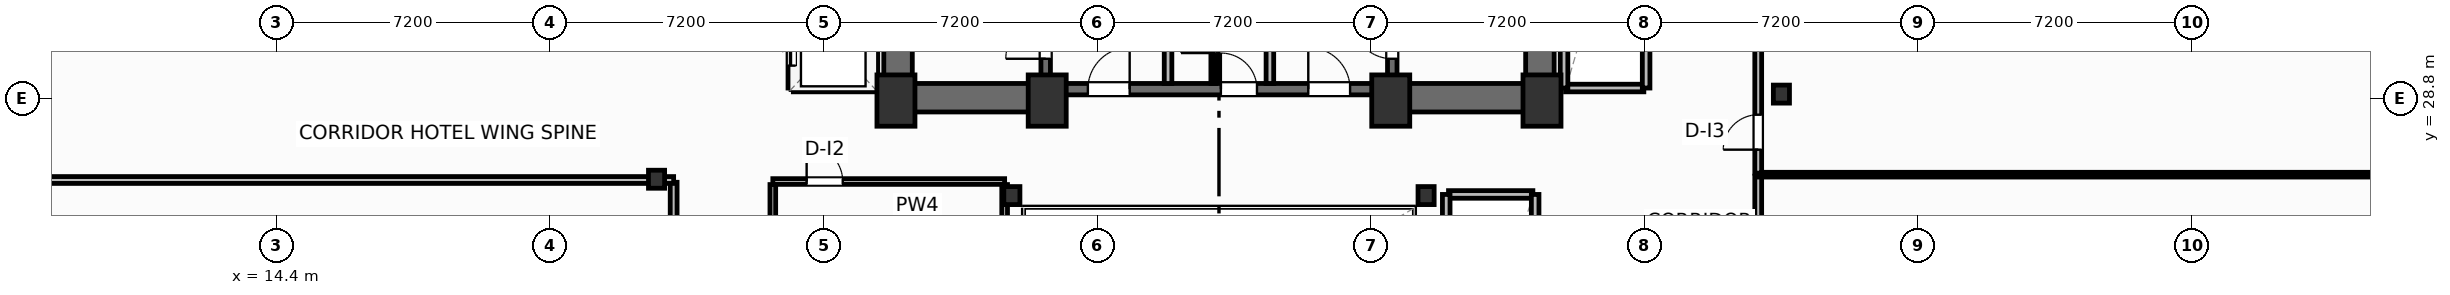
"""IFC4 building model, lengths in metres.
Left out: names, types, materials, properties, quantities, classifications, styles, units other than length and angle.
Written with IfcOpenShell. Run it as: python <this file> out.ifc"""

import sys

from ifc_helpers import new_model, si_unit, direction, frame, frame_2d, origin, origin_2d, place, context, subcontext, project, spatial, rectangle, i_section, extrude, element, fill, save


model = new_model("IFC4")
c1 = context("Model", 3, precision=1e-05, world=origin(), true_north=direction((0.0, 1.0)))
c2 = subcontext(c1, "Body", "Model", "MODEL_VIEW")
j1 = project(units=[si_unit("LENGTHUNIT", "METRE"), si_unit("PLANEANGLEUNIT", "RADIAN")], contexts=[c1])
p1 = place(None, origin())
s1 = spatial("IfcSite", under=j1, at=p1, CompositionType="ELEMENT")
p2 = place(p1, origin())
s2 = spatial("IfcBuilding", under=s1, at=p2, CompositionType="ELEMENT")
p3 = place(p2, frame((0.0, 0.0, 98.4)))
s3 = spatial("IfcBuildingStorey", under=s2, at=p3, CompositionType="ELEMENT", Elevation=98.4)
for number, where, z_axis, x_axis in (
    (1, (30.7, 28.75, 0.0), (0.0, 0.0, 1.0), (1.0, 0.0, 0.0)),
    (2, (34.68, 28.75, 0.0), (0.0, 0.0, 1.0), (1.0, 0.0, 0.0)),
    (3, (43.72, 28.75, 0.0), (0.0, 0.0, 1.0), (1.0, 0.0, 0.0)),
    (4, (47.7, 28.75, 0.0), (0.0, 0.0, 1.0), (1.0, 0.0, 0.0)),
):
    element("IfcColumn", number, at=place(p3, frame(where, z_axis=z_axis, x_axis=x_axis)), inside=s3, PredefinedType="COLUMN", context=c2, shape_type="SweptSolid", body=[
        extrude(rectangle(XDim=1.0, YDim=1.35, at=origin_2d()), origin(), (0.0, 0.0, 1.0), 3.7),
    ])
for number, where, z_axis, x_axis in (
    (5, (33.75, 26.25, 0.0), (0.0, 0.0, 1.0), (1.0, 0.0, 0.0)),
    (6, (44.65, 26.25, 0.0), (0.0, 0.0, 1.0), (1.0, 0.0, 0.0)),
    (7, (24.4, 26.68, 0.0), (0.0, 0.0, 1.0), (1.0, 0.0, 0.0)),
    (8, (54.0, 28.92, 0.0), (0.0, 0.0, 1.0), (1.0, 0.0, 0.0)),
):
    element("IfcColumn", number, at=place(p3, frame(where, z_axis=z_axis, x_axis=x_axis)), inside=s3, PredefinedType="COLUMN", context=c2, shape_type="SweptSolid", body=[
        extrude(i_section(OverallWidth=0.424, OverallDepth=0.474, WebThickness=0.048, FlangeThickness=0.077, FilletRadius=0.025, at=origin_2d()), origin(), (0.0, 0.0, 1.0), 3.7),
    ])
for number, where, z_axis, x_axis in (
    (9, (30.755, 29.2, 0.0), (0.0, 0.0, 1.0), (0.0, 1.0, 0.0)),
    (10, (47.645, 29.2, 0.0), (0.0, 0.0, 1.0), (0.0, 1.0, 0.0)),
):
    element("IfcWall", number, at=place(p3, frame(where, z_axis=z_axis, x_axis=x_axis)), inside=s3, PredefinedType="SHEAR", context=c2, shape_type="SweptSolid", body=[
        extrude(rectangle(XDim=9.22, YDim=0.75, at=frame_2d((4.61, 0.0))), origin(), (0.0, 0.0, 1.0), 3.45),
    ])
p4 = place(p3, frame((30.38, 28.825, 0.0), z_axis=(0.0, 0.0, 1.0), x_axis=(1.0, 0.0, 0.0)))
e11 = element("IfcWall", 11, at=p4, inside=s3, PredefinedType="SHEAR", context=c2, shape_type="SweptSolid", body=[
    extrude(rectangle(XDim=4.42, YDim=0.75, at=frame_2d((2.21, 0.0))), origin(), (0.0, 0.0, 1.0), 3.45),
])
p5 = place(p3, frame((43.6, 28.825, 0.0), z_axis=(0.0, 0.0, 1.0), x_axis=(1.0, 0.0, 0.0)))
e12 = element("IfcWall", 12, at=p5, inside=s3, PredefinedType="SHEAR", context=c2, shape_type="SweptSolid", body=[
    extrude(rectangle(XDim=4.42, YDim=0.75, at=frame_2d((2.21, 0.0))), origin(), (0.0, 0.0, 1.0), 3.45),
])
p6 = place(p3, frame((34.8, 29.05, 0.0), z_axis=(0.0, 0.0, 1.0), x_axis=(1.0, 0.0, 0.0)))
e13 = element("IfcWall", 13, at=p6, inside=s3, PredefinedType="SHEAR", context=c2, shape_type="SweptSolid", body=[
    extrude(rectangle(XDim=8.8, YDim=0.3, at=frame_2d((4.4, 0.0))), origin(), (0.0, 0.0, 1.0), 3.45),
])
p7 = place(p6, frame((0.95, 0.0, 0.0)))
e14 = element("IfcOpeningElement", 14, at=p7, cuts=e13, PredefinedType="OPENING", context=c2, shape_type="SweptSolid", body=[
    extrude(rectangle(XDim=1.1, YDim=2.15, at=frame_2d((0.55, 1.075))), frame((0.0, 0.16, 0.0), z_axis=(0.0, -1.0, 0.0), x_axis=(1.0, 0.0, 0.0)), (0.0, 0.0, 1.0), 0.32),
])
p8 = place(p6, frame((6.75, 0.0, 0.0)))
e15 = element("IfcOpeningElement", 15, at=p8, cuts=e13, PredefinedType="OPENING", context=c2, shape_type="SweptSolid", body=[
    extrude(rectangle(XDim=1.1, YDim=2.15, at=frame_2d((0.55, 1.075))), frame((0.0, 0.16, 0.0), z_axis=(0.0, -1.0, 0.0), x_axis=(1.0, 0.0, 0.0)), (0.0, 0.0, 1.0), 0.32),
])
p9 = place(p6, frame((4.45, 0.0, 0.0)))
e16 = element("IfcOpeningElement", 16, at=p9, cuts=e13, PredefinedType="OPENING", context=c2, shape_type="SweptSolid", body=[
    extrude(rectangle(XDim=0.95, YDim=2.15, at=frame_2d((0.475, 1.075))), frame((0.0, 0.16, 0.0), z_axis=(0.0, -1.0, 0.0), x_axis=(1.0, 0.0, 0.0)), (0.0, 0.0, 1.0), 0.32),
])
p10 = place(p3, frame((34.64, 29.2, 0.0), z_axis=(0.0, 0.0, 1.0), x_axis=(0.0, 1.0, 0.0)))
e17 = element("IfcWall", 17, at=p10, inside=s3, PredefinedType="SHEAR", context=c2, shape_type="SweptSolid", body=[
    extrude(rectangle(XDim=9.22, YDim=0.25, at=frame_2d((4.61, 0.0))), origin(), (0.0, 0.0, 1.0), 3.45),
])
p11 = place(p10, frame((0.65, 0.0, 0.0)))
e18 = element("IfcOpeningElement", 18, at=p11, cuts=e17, PredefinedType="OPENING", context=c2, shape_type="SweptSolid", body=[
    extrude(rectangle(XDim=1.05, YDim=2.15, at=frame_2d((0.525, 1.075))), frame((0.0, 0.135, 0.0), z_axis=(0.0, -1.0, 0.0), x_axis=(1.0, 0.0, 0.0)), (0.0, 0.0, 1.0), 0.27),
])
p12 = place(p3, frame((43.76, 29.2, 0.0), z_axis=(0.0, 0.0, 1.0), x_axis=(0.0, 1.0, 0.0)))
e19 = element("IfcWall", 19, at=p12, inside=s3, PredefinedType="SHEAR", context=c2, shape_type="SweptSolid", body=[
    extrude(rectangle(XDim=9.22, YDim=0.25, at=frame_2d((4.61, 0.0))), origin(), (0.0, 0.0, 1.0), 3.45),
])
p13 = place(p12, frame((0.65, 0.0, 0.0)))
e20 = element("IfcOpeningElement", 20, at=p13, cuts=e19, PredefinedType="OPENING", context=c2, shape_type="SweptSolid", body=[
    extrude(rectangle(XDim=1.05, YDim=2.15, at=frame_2d((0.525, 1.075))), frame((0.0, 0.135, 0.0), z_axis=(0.0, -1.0, 0.0), x_axis=(1.0, 0.0, 0.0)), (0.0, 0.0, 1.0), 0.27),
])
p14 = place(p3, frame((24.85, 23.03, 0.0), z_axis=(0.0, 0.0, 1.0), x_axis=(0.0, 1.0, 0.0)))
e21 = element("IfcWall", 21, at=p14, inside=s3, PredefinedType="PARTITIONING", context=c2, shape_type="SweptSolid", body=[
    extrude(rectangle(XDim=3.57, YDim=0.18, at=frame_2d((1.785, 0.0))), origin(), (0.0, 0.0, 1.0), 3.45),
])
p15 = place(p14, frame((1.5, 0.0, 0.0)))
e22 = element("IfcOpeningElement", 22, at=p15, cuts=e21, PredefinedType="OPENING", context=c2, shape_type="SweptSolid", body=[
    extrude(rectangle(XDim=0.92, YDim=2.05, at=frame_2d((0.46, 1.025))), frame((0.0, 0.1, 0.0), z_axis=(0.0, -1.0, 0.0), x_axis=(1.0, 0.0, 0.0)), (0.0, 0.0, 1.0), 0.2),
])
p16 = place(p3, frame((-0.086, 26.66, 0.0), z_axis=(0.0, 0.0, 1.0), x_axis=(1.0, 0.0, 0.0)))
e23 = element("IfcWall", 23, at=p16, inside=s3, PredefinedType="PARTITIONING", context=c2, shape_type="SweptSolid", body=[
    extrude(rectangle(XDim=24.936, YDim=0.18, at=frame_2d((12.468, 0.0))), origin(), (0.0, 0.0, 1.0), 2.662),
])
p17 = place(p3, frame((53.39, 19.24, 0.0), z_axis=(0.0, 0.0, 1.0), x_axis=(0.0, 1.0, 0.0)))
e24 = element("IfcWall", 24, at=p17, inside=s3, PredefinedType="PARTITIONING", context=c2, shape_type="SweptSolid", body=[
    extrude(rectangle(XDim=7.52, YDim=0.18, at=frame_2d((3.76, 0.0))), origin(), (0.0, 0.0, 1.0), 3.45),
])
p18 = place(p17, frame((2.1, 0.0, 0.0)))
e25 = element("IfcOpeningElement", 25, at=p18, cuts=e24, PredefinedType="OPENING", context=c2, shape_type="SweptSolid", body=[
    extrude(rectangle(XDim=0.92, YDim=2.05, at=frame_2d((0.46, 1.025))), frame((0.0, 0.1, 0.0), z_axis=(0.0, -1.0, 0.0), x_axis=(1.0, 0.0, 0.0)), (0.0, 0.0, 1.0), 0.2),
])
p19 = place(p3, frame((53.39, 26.8, 0.0), z_axis=(0.0, 0.0, 1.0), x_axis=(1.0, 0.0, 0.0)))
e26 = element("IfcWall", 26, at=p19, inside=s3, PredefinedType="PARTITIONING", context=c2, shape_type="SweptSolid", body=[
    extrude(rectangle(XDim=23.61, YDim=0.125, at=frame_2d((11.805, 0.0))), origin(), (0.0, 0.0, 1.0), 3.45),
])
p20 = place(p3, frame((53.39, 26.84, 0.0), z_axis=(0.0, 0.0, 1.0), x_axis=(0.0, 1.0, 0.0)))
e27 = element("IfcWall", 27, at=p20, inside=s3, PredefinedType="PARTITIONING", context=c2, shape_type="SweptSolid", body=[
    extrude(rectangle(XDim=12.46, YDim=0.18, at=frame_2d((6.23, 0.0))), origin(), (0.0, 0.0, 1.0), 3.45),
])
p21 = place(p20, frame((0.618, 0.0, 0.0)))
e28 = element("IfcOpeningElement", 28, at=p21, cuts=e27, PredefinedType="OPENING", context=c2, shape_type="SweptSolid", body=[
    extrude(rectangle(XDim=0.92, YDim=2.05, at=frame_2d((0.46, 1.025))), frame((0.0, 0.1, 0.0), z_axis=(0.0, -1.0, 0.0), x_axis=(1.0, 0.0, 0.0)), (0.0, 0.0, 1.0), 0.2),
])
for number, where, z_axis, x_axis in (
    (29, (37.86, 29.2, 0.0), (0.0, 0.0, 1.0), (0.0, 1.0, 0.0)),
    (30, (40.54, 29.2, 0.0), (0.0, 0.0, 1.0), (0.0, 1.0, 0.0)),
):
    element("IfcWall", number, at=place(p3, frame(where, z_axis=z_axis, x_axis=x_axis)), inside=s3, PredefinedType="PARTITIONING", context=c2, shape_type="SweptSolid", body=[
        extrude(rectangle(XDim=5.18, YDim=0.2, at=frame_2d((2.59, 0.0))), origin(), (0.0, 0.0, 1.0), 3.45),
    ])
p22 = place(p3, frame((39.05, 29.2, 0.0), z_axis=(0.0, 0.0, 1.0), x_axis=(0.0, 1.0, 0.0)))
e31 = element("IfcWall", 31, at=p22, inside=s3, PredefinedType="PARTITIONING", context=c2, shape_type="SweptSolid", body=[
    extrude(rectangle(XDim=5.22, YDim=0.125, at=frame_2d((2.61, 0.0))), origin(), (0.0, 0.0, 1.0), 3.45),
])
p23 = place(p22, frame((0.8, 0.0, 0.0)))
e32 = element("IfcOpeningElement", 32, at=p23, cuts=e31, PredefinedType="OPENING", context=c2, shape_type="SweptSolid", body=[
    extrude(rectangle(XDim=0.85, YDim=2.05, at=frame_2d((0.425, 1.025))), frame((0.0, 0.073, 0.0), z_axis=(0.0, -1.0, 0.0), x_axis=(1.0, 0.0, 0.0)), (0.0, 0.0, 1.0), 0.145),
])
p24 = place(p22, frame((3.4, 0.0, 0.0)))
e33 = element("IfcOpeningElement", 33, at=p24, cuts=e31, PredefinedType="OPENING", context=c2, shape_type="SweptSolid", body=[
    extrude(rectangle(XDim=0.85, YDim=2.05, at=frame_2d((0.425, 1.025))), frame((0.0, 0.073, 0.0), z_axis=(0.0, -1.0, 0.0), x_axis=(1.0, 0.0, 0.0)), (0.0, 0.0, 1.0), 0.145),
])
p25 = place(p3, frame((27.46, 26.62, 0.0), z_axis=(0.0, 0.0, 1.0), x_axis=(1.0, 0.0, 0.0)))
e34 = element("IfcWall", 34, at=p25, inside=s3, PredefinedType="PARTITIONING", context=c2, shape_type="SweptSolid", body=[
    extrude(rectangle(XDim=6.1, YDim=0.15, at=frame_2d((3.05, 0.0))), origin(), (0.0, 0.0, 1.0), 2.662),
])
p26 = place(p25, frame((0.89, 0.0, 0.0)))
e35 = element("IfcOpeningElement", 35, at=p26, cuts=e34, PredefinedType="OPENING", context=c2, shape_type="SweptSolid", body=[
    extrude(rectangle(XDim=0.95, YDim=2.05, at=frame_2d((0.475, 1.025))), frame((0.0, 0.085, 0.0), z_axis=(0.0, -1.0, 0.0), x_axis=(1.0, 0.0, 0.0)), (0.0, 0.0, 1.0), 0.17),
])
p27 = place(p3, frame((27.46, 19.38, 0.0), z_axis=(0.0, 0.0, 1.0), x_axis=(0.0, 1.0, 0.0)))
e36 = element("IfcWall", 36, at=p27, inside=s3, PredefinedType="PARTITIONING", context=c2, shape_type="SweptSolid", body=[
    extrude(rectangle(XDim=7.16, YDim=0.15, at=frame_2d((3.58, 0.0))), origin(), (0.0, 0.0, 1.0), 3.45),
])
p28 = place(p27, frame((1.1, 0.0, 0.0)))
e37 = element("IfcOpeningElement", 37, at=p28, cuts=e36, PredefinedType="OPENING", context=c2, shape_type="SweptSolid", body=[
    extrude(rectangle(XDim=0.9, YDim=2.05, at=frame_2d((0.45, 1.025))), frame((0.0, 0.085, 0.0), z_axis=(0.0, -1.0, 0.0), x_axis=(1.0, 0.0, 0.0)), (0.0, 0.0, 1.0), 0.17),
])
p29 = place(p3, frame((33.56, 19.38, 0.0), z_axis=(0.0, 0.0, 1.0), x_axis=(0.0, 1.0, 0.0)))
e38 = element("IfcWall", 38, at=p29, inside=s3, PredefinedType="PARTITIONING", context=c2, shape_type="SweptSolid", body=[
    extrude(rectangle(XDim=7.16, YDim=0.15, at=frame_2d((3.58, 0.0))), origin(), (0.0, 0.0, 1.0), 2.824),
])
p30 = place(p3, frame((28.0, 29.08, 0.0), z_axis=(0.0, 0.0, 1.0), x_axis=(1.0, 0.0, 0.0)))
e39 = element("IfcWall", 39, at=p30, inside=s3, PredefinedType="PARTITIONING", context=c2, shape_type="SweptSolid", body=[
    extrude(rectangle(XDim=2.1, YDim=0.2, at=frame_2d((1.05, 0.0))), origin(), (0.0, 0.0, 1.0), 3.45),
])
p31 = place(p3, frame((30.12, 29.08, 0.0), z_axis=(0.0, 0.0, 1.0), x_axis=(0.0, 1.0, 0.0)))
e40 = element("IfcWall", 40, at=p31, inside=s3, PredefinedType="PARTITIONING", context=c2, shape_type="SweptSolid", body=[
    extrude(rectangle(XDim=6.89, YDim=0.2, at=frame_2d((3.445, 0.0))), origin(), (0.0, 0.0, 1.0), 3.45),
])
p32 = place(p3, frame((27.96, 29.08, 0.0), z_axis=(0.0, 0.0, 1.0), x_axis=(0.0, 1.0, 0.0)))
e41 = element("IfcWall", 41, at=p32, inside=s3, PredefinedType="PARTITIONING", context=c2, shape_type="SweptSolid", body=[
    extrude(rectangle(XDim=6.89, YDim=0.2, at=frame_2d((3.445, 0.0))), origin(), (0.0, 0.0, 1.0), 3.45),
])
p33 = place(p32, frame((0.59, 0.0, 0.0)))
e42 = element("IfcOpeningElement", 42, at=p33, cuts=e41, PredefinedType="OPENING", context=c2, shape_type="SweptSolid", body=[
    extrude(rectangle(XDim=1.1, YDim=2.15, at=frame_2d((0.55, 1.075))), frame((0.0, 0.11, 0.0), z_axis=(0.0, -1.0, 0.0), x_axis=(1.0, 0.0, 0.0)), (0.0, 0.0, 1.0), 0.22),
])
p34 = place(p32, frame((2.89, 0.0, 0.0)))
e43 = element("IfcOpeningElement", 43, at=p34, cuts=e41, PredefinedType="OPENING", context=c2, shape_type="SweptSolid", body=[
    extrude(rectangle(XDim=1.1, YDim=2.15, at=frame_2d((0.55, 1.075))), frame((0.0, 0.11, 0.0), z_axis=(0.0, -1.0, 0.0), x_axis=(1.0, 0.0, 0.0)), (0.0, 0.0, 1.0), 0.22),
])
p35 = place(p32, frame((5.19, 0.0, 0.0)))
e44 = element("IfcOpeningElement", 44, at=p35, cuts=e41, PredefinedType="OPENING", context=c2, shape_type="SweptSolid", body=[
    extrude(rectangle(XDim=1.1, YDim=2.15, at=frame_2d((0.55, 1.075))), frame((0.0, 0.11, 0.0), z_axis=(0.0, -1.0, 0.0), x_axis=(1.0, 0.0, 0.0)), (0.0, 0.0, 1.0), 0.22),
])
p36 = place(p3, frame((48.32, 29.08, 0.0), z_axis=(0.0, 0.0, 1.0), x_axis=(1.0, 0.0, 0.0)))
e45 = element("IfcWall", 45, at=p36, inside=s3, PredefinedType="PARTITIONING", context=c2, shape_type="SweptSolid", body=[
    extrude(rectangle(XDim=2.06, YDim=0.2, at=frame_2d((1.03, 0.0))), origin(), (0.0, 0.0, 1.0), 2.662),
])
for number, where, z_axis, x_axis in (
    (46, (48.28, 29.08, 0.0), (0.0, 0.0, 1.0), (0.0, 1.0, 0.0)),
    (47, (50.44, 29.08, 0.0), (0.0, 0.0, 1.0), (0.0, 1.0, 0.0)),
):
    element("IfcWall", number, at=place(p3, frame(where, z_axis=z_axis, x_axis=x_axis)), inside=s3, PredefinedType="PARTITIONING", context=c2, shape_type="SweptSolid", body=[
        extrude(rectangle(XDim=6.89, YDim=0.2, at=frame_2d((3.445, 0.0))), origin(), (0.0, 0.0, 1.0), 3.45),
    ])
p37 = place(p3, frame((45.24, 26.28, 0.0), z_axis=(0.0, 0.0, 1.0), x_axis=(1.0, 0.0, 0.0)))
e48 = element("IfcWall", 48, at=p37, inside=s3, PredefinedType="PARTITIONING", context=c2, shape_type="SweptSolid", body=[
    extrude(rectangle(XDim=2.22, YDim=0.2, at=frame_2d((1.11, 0.0))), origin(), (0.0, 0.0, 1.0), 3.45),
])
for number, where, z_axis, x_axis in (
    (49, (45.18, 19.38, 0.0), (0.0, 0.0, 1.0), (0.0, 1.0, 0.0)),
    (50, (47.52, 19.38, 0.0), (0.0, 0.0, 1.0), (0.0, 1.0, 0.0)),
):
    element("IfcWall", number, at=place(p3, frame(where, z_axis=z_axis, x_axis=x_axis)), inside=s3, PredefinedType="PARTITIONING", context=c2, shape_type="SweptSolid", body=[
        extrude(rectangle(XDim=6.9, YDim=0.2, at=frame_2d((3.45, 0.0))), origin(), (0.0, 0.0, 1.0), 3.45),
    ])
p38 = place(p21, origin())
e51 = element("IfcDoor", 51, at=p38, inside=s3, OperationType="SINGLE_SWING_LEFT", PredefinedType="DOOR", context=c2, shape_type="SweptSolid", body=[
    extrude(rectangle(XDim=0.92, YDim=2.05, at=frame_2d((0.46, 1.025))), frame((0.0, 0.025, 0.0), z_axis=(0.0, -1.0, 0.0), x_axis=(1.0, 0.0, 0.0)), (0.0, 0.0, 1.0), 0.05),
])
fill(e28, e51)
p39 = place(p11, origin())
e52 = element("IfcDoor", 52, at=p39, inside=s3, OperationType="SINGLE_SWING_LEFT", PredefinedType="DOOR", context=c2, shape_type="SweptSolid", body=[
    extrude(rectangle(XDim=1.05, YDim=2.15, at=frame_2d((0.525, 1.075))), frame((0.0, 0.025, 0.0), z_axis=(0.0, -1.0, 0.0), x_axis=(1.0, 0.0, 0.0)), (0.0, 0.0, 1.0), 0.05),
])
fill(e18, e52)
p40 = place(p13, origin())
e53 = element("IfcDoor", 53, at=p40, inside=s3, OperationType="SINGLE_SWING_RIGHT", PredefinedType="DOOR", context=c2, shape_type="SweptSolid", body=[
    extrude(rectangle(XDim=1.05, YDim=2.15, at=frame_2d((0.525, 1.075))), frame((0.0, 0.025, 0.0), z_axis=(0.0, -1.0, 0.0), x_axis=(1.0, 0.0, 0.0)), (0.0, 0.0, 1.0), 0.05),
])
fill(e20, e53)
p41 = place(p7, origin())
e54 = element("IfcDoor", 54, at=p41, inside=s3, OperationType="SINGLE_SWING_RIGHT", PredefinedType="DOOR", context=c2, shape_type="SweptSolid", body=[
    extrude(rectangle(XDim=1.1, YDim=2.15, at=frame_2d((0.55, 1.075))), frame((0.0, 0.025, 0.0), z_axis=(0.0, -1.0, 0.0), x_axis=(1.0, 0.0, 0.0)), (0.0, 0.0, 1.0), 0.05),
])
fill(e14, e54)
p42 = place(p8, origin())
e55 = element("IfcDoor", 55, at=p42, inside=s3, OperationType="SINGLE_SWING_LEFT", PredefinedType="DOOR", context=c2, shape_type="SweptSolid", body=[
    extrude(rectangle(XDim=1.1, YDim=2.15, at=frame_2d((0.55, 1.075))), frame((0.0, 0.025, 0.0), z_axis=(0.0, -1.0, 0.0), x_axis=(1.0, 0.0, 0.0)), (0.0, 0.0, 1.0), 0.05),
])
fill(e15, e55)
p43 = place(p23, origin())
e56 = element("IfcDoor", 56, at=p43, inside=s3, OperationType="SINGLE_SWING_LEFT", PredefinedType="DOOR", context=c2, shape_type="SweptSolid", body=[
    extrude(rectangle(XDim=0.85, YDim=2.05, at=frame_2d((0.425, 1.025))), frame((0.0, 0.025, 0.0), z_axis=(0.0, -1.0, 0.0), x_axis=(1.0, 0.0, 0.0)), (0.0, 0.0, 1.0), 0.05),
])
fill(e32, e56)
p44 = place(p9, origin())
e57 = element("IfcDoor", 57, at=p44, inside=s3, OperationType="SINGLE_SWING_LEFT", PredefinedType="DOOR", context=c2, shape_type="SweptSolid", body=[
    extrude(rectangle(XDim=0.95, YDim=2.15, at=frame_2d((0.475, 1.075))), frame((0.0, 0.025, 0.0), z_axis=(0.0, -1.0, 0.0), x_axis=(1.0, 0.0, 0.0)), (0.0, 0.0, 1.0), 0.05),
])
fill(e16, e57)
p45 = place(p26, origin())
e58 = element("IfcDoor", 58, at=p45, inside=s3, OperationType="SINGLE_SWING_LEFT", PredefinedType="DOOR", context=c2, shape_type="SweptSolid", body=[
    extrude(rectangle(XDim=0.95, YDim=2.05, at=frame_2d((0.475, 1.025))), frame((0.0, 0.025, 0.0), z_axis=(0.0, -1.0, 0.0), x_axis=(1.0, 0.0, 0.0)), (0.0, 0.0, 1.0), 0.05),
])
fill(e35, e58)
p46 = place(p33, origin())
e59 = element("IfcDoor", 59, at=p46, inside=s3, OperationType="SLIDING_TO_LEFT", PredefinedType="DOOR", context=c2, shape_type="SweptSolid", body=[
    extrude(rectangle(XDim=1.1, YDim=2.15, at=frame_2d((0.55, 1.075))), frame((0.0, 0.025, 0.0), z_axis=(0.0, -1.0, 0.0), x_axis=(1.0, 0.0, 0.0)), (0.0, 0.0, 1.0), 0.05),
])
fill(e42, e59)
save(model, sys.argv[1])
